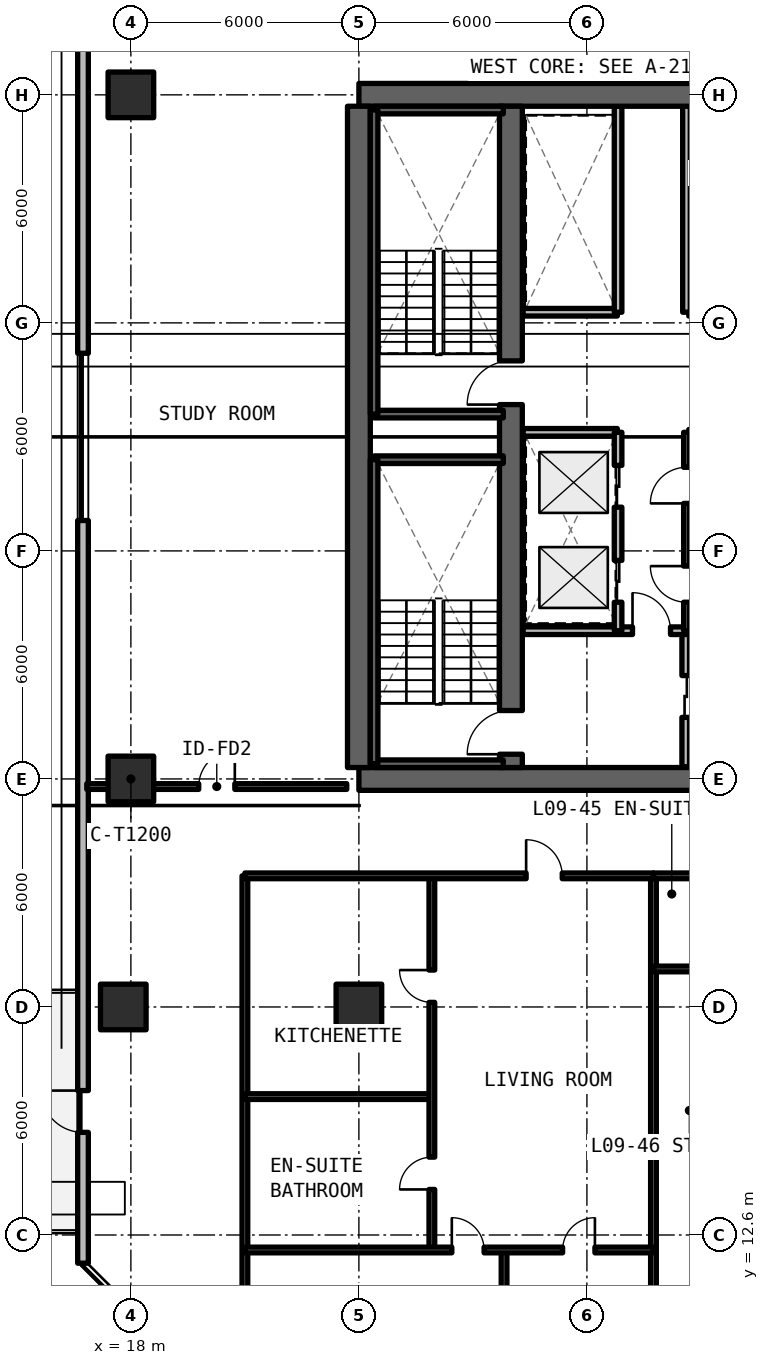
"""IFC4 building model, lengths in metres.
Left out: names, types, materials, properties, quantities, classifications, styles, units other than length and angle.
Written with IfcOpenShell. Run it as: python <this file> out.ifc"""

import sys

from ifc_helpers import new_model, si_unit, direction, frame, frame_2d, origin, origin_2d, place, context, subcontext, project, spatial, rectangle, extrude, element, fill, save


model = new_model("IFC4")
c1 = context("Model", 3, precision=1e-05, world=origin(), true_north=direction((0.0, 1.0)))
c2 = subcontext(c1, "Body", "Model", "MODEL_VIEW")
j1 = project(units=[si_unit("LENGTHUNIT", "METRE"), si_unit("PLANEANGLEUNIT", "RADIAN")], contexts=[c1])
p1 = place(None, origin())
s1 = spatial("IfcSite", under=j1, at=p1, CompositionType="ELEMENT")
p2 = place(p1, origin())
s2 = spatial("IfcBuilding", under=s1, at=p2, CompositionType="ELEMENT")
p3 = place(p2, frame((0.0, 0.0, 35.64)))
s3 = spatial("IfcBuildingStorey", under=s2, at=p3, CompositionType="ELEMENT", Elevation=35.64)
for number, where, z_axis, x_axis in (
    (1, (24.0, 24.6, 0.0), (0.0, 0.0, 1.0), (1.0, 0.0, 0.0)),
    (2, (36.0, 42.6, 0.0), (0.0, 0.0, 1.0), (-1.0, 0.0, 0.0)),
):
    element("IfcWall", number, at=place(p3, frame(where, z_axis=z_axis, x_axis=x_axis)), inside=s3, PredefinedType="SHEAR", context=c2, shape_type="SweptSolid", body=[
        extrude(rectangle(XDim=12.0, YDim=0.6, at=frame_2d((6.0, 0.0))), origin(), (0.0, 0.0, 1.0), 3.3),
    ])
p4 = place(p3, frame((24.0, 24.9, 0.0), z_axis=(0.0, 0.0, 1.0), x_axis=(0.0, 1.0, 0.0)))
e3 = element("IfcWall", 3, at=p4, inside=s3, PredefinedType="SHEAR", context=c2, shape_type="SweptSolid", body=[
    extrude(rectangle(XDim=17.4, YDim=0.6, at=frame_2d((8.7, 0.0))), origin(), (0.0, 0.0, 1.0), 3.3),
])
p5 = place(p3, frame((28.0, 24.9, 0.0), z_axis=(0.0, 0.0, 1.0), x_axis=(0.0, 1.0, 0.0)))
e4 = element("IfcWall", 4, at=p5, inside=s3, PredefinedType="SHEAR", context=c2, shape_type="SweptSolid", body=[
    extrude(rectangle(XDim=17.4, YDim=0.6, at=frame_2d((8.7, 0.0))), origin(), (0.0, 0.0, 1.0), 3.3),
])
p6 = place(p5, frame((0.35, 0.0, 0.0)))
e5 = element("IfcOpeningElement", 5, at=p6, cuts=e4, PredefinedType="OPENING", context=c2, shape_type="SweptSolid", body=[
    extrude(rectangle(XDim=1.15, YDim=2.15, at=frame_2d((0.575, 1.075))), frame((0.0, 0.31, 0.0), z_axis=(0.0, -1.0, 0.0), x_axis=(1.0, 0.0, 0.0)), (0.0, 0.0, 1.0), 0.62),
])
p7 = place(p5, frame((9.55, 0.0, 0.0)))
e6 = element("IfcOpeningElement", 6, at=p7, cuts=e4, PredefinedType="OPENING", context=c2, shape_type="SweptSolid", body=[
    extrude(rectangle(XDim=1.15, YDim=2.15, at=frame_2d((0.575, 1.075))), frame((0.0, 0.31, 0.0), z_axis=(0.0, -1.0, 0.0), x_axis=(1.0, 0.0, 0.0)), (0.0, 0.0, 1.0), 0.62),
])
for number, where, z_axis, x_axis in (
    (7, (18.0, 24.6, 0.0), (0.0, 0.0, 1.0), (1.0, 0.0, 0.0)),
    (8, (18.0, 42.6, 0.0), (0.0, 0.0, 1.0), (1.0, 0.0, 0.0)),
    (9, (17.8, 18.6, 0.0), (0.0, 0.0, 1.0), (1.0, 0.0, 0.0)),
    (10, (24.0, 18.6, 0.0), (0.0, 0.0, 1.0), (1.0, 0.0, 0.0)),
):
    element("IfcColumn", number, at=place(p3, frame(where, z_axis=z_axis, x_axis=x_axis)), inside=s3, PredefinedType="COLUMN", context=c2, shape_type="SweptSolid", body=[
        extrude(rectangle(XDim=1.2, YDim=1.2, at=origin_2d()), origin(), (0.0, 0.0, 1.0), 3.3),
    ])
p8 = place(p3, frame((16.74, 55.342, 0.0), z_axis=(0.0, 0.0, 1.0), x_axis=(0.0, -1.0, 0.0)))
e11 = element("IfcWall", 11, at=p8, inside=s3, PredefinedType="SOLIDWALL", context=c2, shape_type="SweptSolid", body=[
    extrude(rectangle(XDim=43.484, YDim=0.28, at=frame_2d((21.742, 0.0))), origin(), (0.0, 0.0, 1.0), 3.08),
])
p9 = place(p8, frame((38.942, 0.0, 0.0)))
e12 = element("IfcOpeningElement", 12, at=p9, cuts=e11, PredefinedType="OPENING", context=c2, shape_type="SweptSolid", body=[
    extrude(rectangle(XDim=1.1, YDim=2.15, at=frame_2d((0.55, 1.075))), frame((0.0, 0.15, 0.0), z_axis=(0.0, -1.0, 0.0), x_axis=(1.0, 0.0, 0.0)), (0.0, 0.0, 1.0), 0.3),
])
p10 = place(p8, frame((19.542, 0.0, 0.78)))
e13 = element("IfcOpeningElement", 13, at=p10, cuts=e11, PredefinedType="OPENING", context=c2, shape_type="SweptSolid", body=[
    extrude(rectangle(XDim=4.4, YDim=1.66, at=frame_2d((2.2, 0.83))), frame((0.0, 0.15, 0.0), z_axis=(0.0, -1.0, 0.0), x_axis=(1.0, 0.0, 0.0)), (0.0, 0.0, 1.0), 0.3),
])
p11 = place(p3, frame((32.6, 24.92, 0.0), z_axis=(0.0, 0.0, 1.0), x_axis=(0.0, 1.0, 0.0)))
e14 = element("IfcWall", 14, at=p11, inside=s3, PredefinedType="SOLIDWALL", context=c2, shape_type="SweptSolid", body=[
    extrude(rectangle(XDim=3.58, YDim=0.2, at=frame_2d((1.79, 0.0))), origin(), (0.0, 0.0, 1.0), 2.35),
])
p12 = place(p11, frame((1.3, 0.0, 0.0)))
e15 = element("IfcOpeningElement", 15, at=p12, cuts=e14, PredefinedType="OPENING", context=c2, shape_type="SweptSolid", body=[
    extrude(rectangle(XDim=1.1, YDim=2.2, at=frame_2d((0.55, 1.1))), frame((0.0, 0.11, 0.0), z_axis=(0.0, -1.0, 0.0), x_axis=(1.0, 0.0, 0.0)), (0.0, 0.0, 1.0), 0.22),
])
p13 = place(p3, frame((28.32, 28.5, 0.0), z_axis=(0.0, 0.0, 1.0), x_axis=(1.0, 0.0, 0.0)))
e16 = element("IfcWall", 16, at=p13, inside=s3, PredefinedType="SOLIDWALL", context=c2, shape_type="SweptSolid", body=[
    extrude(rectangle(XDim=7.36, YDim=0.2, at=frame_2d((3.68, 0.0))), origin(), (0.0, 0.0, 1.0), 2.35),
])
p14 = place(p13, frame((2.88, 0.0, 0.0)))
e17 = element("IfcOpeningElement", 17, at=p14, cuts=e16, PredefinedType="OPENING", context=c2, shape_type="SweptSolid", body=[
    extrude(rectangle(XDim=1.0, YDim=2.15, at=frame_2d((0.5, 1.075))), frame((0.0, 0.11, 0.0), z_axis=(0.0, -1.0, 0.0), x_axis=(1.0, 0.0, 0.0)), (0.0, 0.0, 1.0), 0.22),
])
p15 = place(p3, frame((28.32, 33.72, 0.0), z_axis=(0.0, 0.0, 1.0), x_axis=(1.0, 0.0, 0.0)))
e18 = element("IfcWall", 18, at=p15, inside=s3, PredefinedType="SOLIDWALL", context=c2, shape_type="SweptSolid", body=[
    extrude(rectangle(XDim=2.48, YDim=0.2, at=frame_2d((1.24, 0.0))), origin(), (0.0, 0.0, 1.0), 2.35),
])
p16 = place(p3, frame((30.82, 28.5, 0.0), z_axis=(0.0, 0.0, 1.0), x_axis=(0.0, 1.0, 0.0)))
e19 = element("IfcWall", 19, at=p16, inside=s3, PredefinedType="SOLIDWALL", context=c2, shape_type="SweptSolid", body=[
    extrude(rectangle(XDim=5.22, YDim=0.2, at=frame_2d((2.61, 0.0))), origin(), (0.0, 0.0, 1.0), 2.35),
])
p17 = place(p16, frame((0.75, 0.0, 0.0)))
e20 = element("IfcOpeningElement", 20, at=p17, cuts=e19, PredefinedType="OPENING", context=c2, shape_type="SweptSolid", body=[
    extrude(rectangle(XDim=1.1, YDim=2.2, at=frame_2d((0.55, 1.1))), frame((0.0, 0.11, 0.0), z_axis=(0.0, -1.0, 0.0), x_axis=(1.0, 0.0, 0.0)), (0.0, 0.0, 1.0), 0.22),
])
p18 = place(p16, frame((3.25, 0.0, 0.0)))
e21 = element("IfcOpeningElement", 21, at=p18, cuts=e19, PredefinedType="OPENING", context=c2, shape_type="SweptSolid", body=[
    extrude(rectangle(XDim=1.1, YDim=2.2, at=frame_2d((0.55, 1.1))), frame((0.0, 0.11, 0.0), z_axis=(0.0, -1.0, 0.0), x_axis=(1.0, 0.0, 0.0)), (0.0, 0.0, 1.0), 0.22),
])
p19 = place(p3, frame((32.62, 28.5, 0.0), z_axis=(0.0, 0.0, 1.0), x_axis=(0.0, 1.0, 0.0)))
e22 = element("IfcWall", 22, at=p19, inside=s3, PredefinedType="SOLIDWALL", context=c2, shape_type="SweptSolid", body=[
    extrude(rectangle(XDim=5.22, YDim=0.15, at=frame_2d((2.61, 0.0))), origin(), (0.0, 0.0, 1.0), 2.35),
])
p20 = place(p19, frame((0.75, 0.0, 0.0)))
e23 = element("IfcOpeningElement", 23, at=p20, cuts=e22, PredefinedType="OPENING", context=c2, shape_type="SweptSolid", body=[
    extrude(rectangle(XDim=0.95, YDim=2.15, at=frame_2d((0.475, 1.075))), frame((0.0, 0.085, 0.0), z_axis=(0.0, -1.0, 0.0), x_axis=(1.0, 0.0, 0.0)), (0.0, 0.0, 1.0), 0.17),
])
p21 = place(p19, frame((3.35, 0.0, 0.0)))
e24 = element("IfcOpeningElement", 24, at=p21, cuts=e22, PredefinedType="OPENING", context=c2, shape_type="SweptSolid", body=[
    extrude(rectangle(XDim=0.95, YDim=2.15, at=frame_2d((0.475, 1.075))), frame((0.0, 0.085, 0.0), z_axis=(0.0, -1.0, 0.0), x_axis=(1.0, 0.0, 0.0)), (0.0, 0.0, 1.0), 0.17),
])
p22 = place(p3, frame((28.32, 36.88, 0.0), z_axis=(0.0, 0.0, 1.0), x_axis=(1.0, 0.0, 0.0)))
e25 = element("IfcWall", 25, at=p22, inside=s3, PredefinedType="SOLIDWALL", context=c2, shape_type="SweptSolid", body=[
    extrude(rectangle(XDim=2.48, YDim=0.2, at=frame_2d((1.24, 0.0))), origin(), (0.0, 0.0, 1.0), 2.35),
])
for number, where, z_axis, x_axis in (
    (26, (30.82, 36.88, 0.0), (0.0, 0.0, 1.0), (0.0, 1.0, 0.0)),
    (27, (32.62, 36.88, 0.0), (0.0, 0.0, 1.0), (0.0, 1.0, 0.0)),
):
    element("IfcWall", number, at=place(p3, frame(where, z_axis=z_axis, x_axis=x_axis)), inside=s3, PredefinedType="SOLIDWALL", context=c2, shape_type="SweptSolid", body=[
        extrude(rectangle(XDim=5.42, YDim=0.2, at=frame_2d((2.71, 0.0))), origin(), (0.0, 0.0, 1.0), 2.35),
    ])
p23 = place(p3, frame((16.84, 24.4, 0.0), z_axis=(0.0, 0.0, 1.0), x_axis=(1.0, 0.0, 0.0)))
e28 = element("IfcWall", 28, at=p23, inside=s3, PredefinedType="SOLIDWALL", context=c2, shape_type="SweptSolid", body=[
    extrude(rectangle(XDim=6.84, YDim=0.15, at=frame_2d((3.42, 0.0))), origin(), (0.0, 0.0, 1.0), 2.295),
])
p24 = place(p23, frame((2.945, 0.0, 0.0)))
e29 = element("IfcOpeningElement", 29, at=p24, cuts=e28, PredefinedType="OPENING", context=c2, shape_type="SweptSolid", body=[
    extrude(rectangle(XDim=0.95, YDim=2.15, at=frame_2d((0.475, 1.075))), frame((0.0, 0.085, 0.0), z_axis=(0.0, -1.0, 0.0), x_axis=(1.0, 0.0, 0.0)), (0.0, 0.0, 1.0), 0.17),
])
for number, where, z_axis, x_axis in (
    (30, (21.0, 7.88, 0.0), (0.0, 0.0, 1.0), (0.0, 1.0, 0.0)),
    (31, (31.751, 7.88, 0.0), (0.0, 0.0, 1.0), (0.0, 1.0, 0.0)),
):
    element("IfcWall", number, at=place(p3, frame(where, z_axis=z_axis, x_axis=x_axis)), inside=s3, PredefinedType="SOLIDWALL", context=c2, shape_type="SweptSolid", body=[
        extrude(rectangle(XDim=14.17, YDim=0.15, at=frame_2d((7.085, 0.0))), origin(), (0.0, 0.0, 1.0), 2.35),
    ])
p25 = place(p3, frame((21.0, 16.242, 0.0), z_axis=(0.0, 0.0, 1.0), x_axis=(1.0, 0.0, 0.0)))
e32 = element("IfcWall", 32, at=p25, inside=s3, PredefinedType="PARTITIONING", context=c2, shape_type="SweptSolid", body=[
    extrude(rectangle(XDim=4.92, YDim=0.15, at=frame_2d((2.46, 0.0))), origin(), (0.0, 0.0, 1.0), 2.35),
])
p26 = place(p3, frame((25.92, 12.206, 0.0), z_axis=(0.0, 0.0, 1.0), x_axis=(0.0, 1.0, 0.0)))
e33 = element("IfcWall", 33, at=p26, inside=s3, PredefinedType="PARTITIONING", context=c2, shape_type="SweptSolid", body=[
    extrude(rectangle(XDim=9.844, YDim=0.15, at=frame_2d((4.922, 0.0))), origin(), (0.0, 0.0, 1.0), 2.35),
])
p27 = place(p26, frame((1.593, 0.0, 0.0)))
e34 = element("IfcOpeningElement", 34, at=p27, cuts=e33, PredefinedType="OPENING", context=c2, shape_type="SweptSolid", body=[
    extrude(rectangle(XDim=0.85, YDim=2.1, at=frame_2d((0.425, 1.05))), frame((0.0, 0.085, 0.0), z_axis=(0.0, -1.0, 0.0), x_axis=(1.0, 0.0, 0.0)), (0.0, 0.0, 1.0), 0.17),
])
p28 = place(p26, frame((6.515, 0.0, 0.0)))
e35 = element("IfcOpeningElement", 35, at=p28, cuts=e33, PredefinedType="OPENING", context=c2, shape_type="SweptSolid", body=[
    extrude(rectangle(XDim=0.85, YDim=2.1, at=frame_2d((0.425, 1.05))), frame((0.0, 0.085, 0.0), z_axis=(0.0, -1.0, 0.0), x_axis=(1.0, 0.0, 0.0)), (0.0, 0.0, 1.0), 0.17),
])
p29 = place(p3, frame((27.82, 7.88, 0.0), z_axis=(0.0, 0.0, 1.0), x_axis=(0.0, 1.0, 0.0)))
e36 = element("IfcWall", 36, at=p29, inside=s3, PredefinedType="PARTITIONING", context=c2, shape_type="SweptSolid", body=[
    extrude(rectangle(XDim=4.326, YDim=0.15, at=frame_2d((2.163, 0.0))), origin(), (0.0, 0.0, 1.0), 2.35),
])
p30 = place(p3, frame((21.0, 12.206, 0.0), z_axis=(0.0, 0.0, 1.0), x_axis=(1.0, 0.0, 0.0)))
e37 = element("IfcWall", 37, at=p30, inside=s3, PredefinedType="PARTITIONING", context=c2, shape_type="SweptSolid", body=[
    extrude(rectangle(XDim=10.751, YDim=0.15, at=frame_2d((5.375, 0.0))), origin(), (0.0, 0.0, 1.0), 2.35),
])
p31 = place(p30, frame((5.445, 0.0, 0.0)))
e38 = element("IfcOpeningElement", 38, at=p31, cuts=e37, PredefinedType="OPENING", context=c2, shape_type="SweptSolid", body=[
    extrude(rectangle(XDim=0.85, YDim=2.1, at=frame_2d((0.425, 1.05))), frame((0.0, 0.085, 0.0), z_axis=(0.0, -1.0, 0.0), x_axis=(1.0, 0.0, 0.0)), (0.0, 0.0, 1.0), 0.17),
])
p32 = place(p30, frame((8.361, 0.0, 0.0)))
e39 = element("IfcOpeningElement", 39, at=p32, cuts=e37, PredefinedType="OPENING", context=c2, shape_type="SweptSolid", body=[
    extrude(rectangle(XDim=0.85, YDim=2.1, at=frame_2d((0.425, 1.05))), frame((0.0, 0.085, 0.0), z_axis=(0.0, -1.0, 0.0), x_axis=(1.0, 0.0, 0.0)), (0.0, 0.0, 1.0), 0.17),
])
p33 = place(p3, frame((21.0, 22.05, 0.0), z_axis=(0.0, 0.0, 1.0), x_axis=(1.0, 0.0, 0.0)))
e40 = element("IfcWall", 40, at=p33, inside=s3, PredefinedType="SOLIDWALL", context=c2, shape_type="SweptSolid", body=[
    extrude(rectangle(XDim=10.751, YDim=0.15, at=frame_2d((5.375, 0.0))), origin(), (0.0, 0.0, 1.0), 2.35),
])
p34 = place(p33, frame((7.401, 0.0, 0.0)))
e41 = element("IfcOpeningElement", 41, at=p34, cuts=e40, PredefinedType="OPENING", context=c2, shape_type="SweptSolid", body=[
    extrude(rectangle(XDim=0.95, YDim=2.15, at=frame_2d((0.475, 1.075))), frame((0.0, 0.085, 0.0), z_axis=(0.0, -1.0, 0.0), x_axis=(1.0, 0.0, 0.0)), (0.0, 0.0, 1.0), 0.17),
])
p35 = place(p3, frame((31.751, 19.6, 0.0), z_axis=(0.0, 0.0, 1.0), x_axis=(1.0, 0.0, 0.0)))
e42 = element("IfcWall", 42, at=p35, inside=s3, PredefinedType="PARTITIONING", context=c2, shape_type="SweptSolid", body=[
    extrude(rectangle(XDim=1.959, YDim=0.15, at=frame_2d((0.979, 0.0))), origin(), (0.0, 0.0, 1.0), 2.35),
])
p36 = place(p3, frame((31.751, 22.05, 0.0), z_axis=(0.0, 0.0, 1.0), x_axis=(1.0, 0.0, 0.0)))
e43 = element("IfcWall", 43, at=p36, inside=s3, PredefinedType="SOLIDWALL", context=c2, shape_type="SweptSolid", body=[
    extrude(rectangle(XDim=5.761, YDim=0.15, at=frame_2d((2.881, 0.0))), origin(), (0.0, 0.0, 1.0), 2.35),
])
p37 = place(p36, frame((3.425, 0.0, 0.0)))
e44 = element("IfcOpeningElement", 44, at=p37, cuts=e43, PredefinedType="OPENING", context=c2, shape_type="SweptSolid", body=[
    extrude(rectangle(XDim=0.95, YDim=2.15, at=frame_2d((0.475, 1.075))), frame((0.0, 0.085, 0.0), z_axis=(0.0, -1.0, 0.0), x_axis=(1.0, 0.0, 0.0)), (0.0, 0.0, 1.0), 0.17),
])
for number, where, z_axis, x_axis in (
    (45, (24.4, 25.0, 0.0), (0.0, 0.0, 1.0), (1.0, 0.0, 0.0)),
    (46, (27.8, 33.0, 0.0), (0.0, 0.0, 1.0), (-1.0, 0.0, 0.0)),
):
    element("IfcWall", number, at=place(p3, frame(where, z_axis=z_axis, x_axis=x_axis)), inside=s3, PredefinedType="SOLIDWALL", context=c2, shape_type="SweptSolid", body=[
        extrude(rectangle(XDim=3.4, YDim=0.2, at=frame_2d((1.7, 0.0))), origin(), (0.0, 0.0, 1.0), 3.3),
    ])
p38 = place(p3, frame((24.4, 33.0, 0.0), z_axis=(0.0, 0.0, 1.0), x_axis=(0.0, -1.0, 0.0)))
e47 = element("IfcWall", 47, at=p38, inside=s3, PredefinedType="SOLIDWALL", context=c2, shape_type="SweptSolid", body=[
    extrude(rectangle(XDim=8.0, YDim=0.2, at=frame_2d((4.0, 0.0))), origin(), (0.0, 0.0, 1.0), 3.3),
])
for number, where, z_axis, x_axis in (
    (48, (24.4, 34.2, 0.0), (0.0, 0.0, 1.0), (1.0, 0.0, 0.0)),
    (49, (27.8, 42.2, 0.0), (0.0, 0.0, 1.0), (-1.0, 0.0, 0.0)),
):
    element("IfcWall", number, at=place(p3, frame(where, z_axis=z_axis, x_axis=x_axis)), inside=s3, PredefinedType="SOLIDWALL", context=c2, shape_type="SweptSolid", body=[
        extrude(rectangle(XDim=3.4, YDim=0.2, at=frame_2d((1.7, 0.0))), origin(), (0.0, 0.0, 1.0), 3.3),
    ])
p39 = place(p3, frame((24.4, 42.2, 0.0), z_axis=(0.0, 0.0, 1.0), x_axis=(0.0, -1.0, 0.0)))
e50 = element("IfcWall", 50, at=p39, inside=s3, PredefinedType="SOLIDWALL", context=c2, shape_type="SweptSolid", body=[
    extrude(rectangle(XDim=8.0, YDim=0.2, at=frame_2d((4.0, 0.0))), origin(), (0.0, 0.0, 1.0), 3.3),
])
p40 = place(p9, frame((1.1, 0.0, 0.0), z_axis=(0.0, 0.0, 1.0), x_axis=(-1.0, 0.0, 0.0)))
e51 = element("IfcDoor", 51, at=p40, inside=s3, OperationType="SINGLE_SWING_LEFT", PredefinedType="DOOR", context=c2, shape_type="SweptSolid", body=[
    extrude(rectangle(XDim=1.1, YDim=2.15, at=frame_2d((0.55, 1.075))), frame((0.0, 0.025, 0.0), z_axis=(0.0, -1.0, 0.0), x_axis=(1.0, 0.0, 0.0)), (0.0, 0.0, 1.0), 0.05),
])
fill(e12, e51)
p41 = place(p10, origin())
e52 = element("IfcWindow", 52, at=p41, inside=s3, PartitioningType="SINGLE_PANEL", PredefinedType="WINDOW", context=c2, shape_type="SweptSolid", body=[
    extrude(rectangle(XDim=4.4, YDim=1.66, at=frame_2d((2.2, 0.83))), frame((0.0, 0.03, 0.0), z_axis=(0.0, -1.0, 0.0), x_axis=(1.0, 0.0, 0.0)), (0.0, 0.0, 1.0), 0.06),
])
fill(e13, e52)
p42 = place(p12, origin())
e53 = element("IfcDoor", 53, at=p42, inside=s3, OperationType="SLIDING_TO_LEFT", PredefinedType="DOOR", context=c2, shape_type="SweptSolid", body=[
    extrude(rectangle(XDim=1.1, YDim=2.2, at=frame_2d((0.55, 1.1))), frame((0.0, 0.025, 0.0), z_axis=(0.0, -1.0, 0.0), x_axis=(1.0, 0.0, 0.0)), (0.0, 0.0, 1.0), 0.05),
])
fill(e15, e53)
p43 = place(p14, origin())
e54 = element("IfcDoor", 54, at=p43, inside=s3, OperationType="SINGLE_SWING_LEFT", PredefinedType="DOOR", context=c2, shape_type="SweptSolid", body=[
    extrude(rectangle(XDim=1.0, YDim=2.15, at=frame_2d((0.5, 1.075))), frame((0.0, 0.025, 0.0), z_axis=(0.0, -1.0, 0.0), x_axis=(1.0, 0.0, 0.0)), (0.0, 0.0, 1.0), 0.05),
])
fill(e17, e54)
p44 = place(p17, origin())
e55 = element("IfcDoor", 55, at=p44, inside=s3, OperationType="SLIDING_TO_LEFT", PredefinedType="DOOR", context=c2, shape_type="SweptSolid", body=[
    extrude(rectangle(XDim=1.1, YDim=2.2, at=frame_2d((0.55, 1.1))), frame((0.0, 0.025, 0.0), z_axis=(0.0, -1.0, 0.0), x_axis=(1.0, 0.0, 0.0)), (0.0, 0.0, 1.0), 0.05),
])
fill(e20, e55)
p45 = place(p18, origin())
e56 = element("IfcDoor", 56, at=p45, inside=s3, OperationType="SLIDING_TO_RIGHT", PredefinedType="DOOR", context=c2, shape_type="SweptSolid", body=[
    extrude(rectangle(XDim=1.1, YDim=2.2, at=frame_2d((0.55, 1.1))), frame((0.0, 0.025, 0.0), z_axis=(0.0, -1.0, 0.0), x_axis=(1.0, 0.0, 0.0)), (0.0, 0.0, 1.0), 0.05),
])
fill(e21, e56)
p46 = place(p20, origin())
e57 = element("IfcDoor", 57, at=p46, inside=s3, OperationType="SINGLE_SWING_RIGHT", PredefinedType="DOOR", context=c2, shape_type="SweptSolid", body=[
    extrude(rectangle(XDim=0.95, YDim=2.15, at=frame_2d((0.475, 1.075))), frame((0.0, 0.025, 0.0), z_axis=(0.0, -1.0, 0.0), x_axis=(1.0, 0.0, 0.0)), (0.0, 0.0, 1.0), 0.05),
])
fill(e23, e57)
p47 = place(p21, origin())
e58 = element("IfcDoor", 58, at=p47, inside=s3, OperationType="SINGLE_SWING_LEFT", PredefinedType="DOOR", context=c2, shape_type="SweptSolid", body=[
    extrude(rectangle(XDim=0.95, YDim=2.15, at=frame_2d((0.475, 1.075))), frame((0.0, 0.025, 0.0), z_axis=(0.0, -1.0, 0.0), x_axis=(1.0, 0.0, 0.0)), (0.0, 0.0, 1.0), 0.05),
])
fill(e24, e58)
p48 = place(p24, origin())
e59 = element("IfcDoor", 59, at=p48, inside=s3, OperationType="SINGLE_SWING_RIGHT", PredefinedType="DOOR", context=c2, shape_type="SweptSolid", body=[
    extrude(rectangle(XDim=0.95, YDim=2.15, at=frame_2d((0.475, 1.075))), frame((0.0, 0.025, 0.0), z_axis=(0.0, -1.0, 0.0), x_axis=(1.0, 0.0, 0.0)), (0.0, 0.0, 1.0), 0.05),
])
fill(e29, e59)
p49 = place(p27, origin())
e60 = element("IfcDoor", 60, at=p49, inside=s3, OperationType="SINGLE_SWING_LEFT", PredefinedType="DOOR", context=c2, shape_type="SweptSolid", body=[
    extrude(rectangle(XDim=0.85, YDim=2.1, at=frame_2d((0.425, 1.05))), frame((0.0, 0.025, 0.0), z_axis=(0.0, -1.0, 0.0), x_axis=(1.0, 0.0, 0.0)), (0.0, 0.0, 1.0), 0.05),
])
fill(e34, e60)
p50 = place(p28, origin())
e61 = element("IfcDoor", 61, at=p50, inside=s3, OperationType="SINGLE_SWING_RIGHT", PredefinedType="DOOR", context=c2, shape_type="SweptSolid", body=[
    extrude(rectangle(XDim=0.85, YDim=2.1, at=frame_2d((0.425, 1.05))), frame((0.0, 0.025, 0.0), z_axis=(0.0, -1.0, 0.0), x_axis=(1.0, 0.0, 0.0)), (0.0, 0.0, 1.0), 0.05),
])
fill(e35, e61)
p51 = place(p31, origin())
e62 = element("IfcDoor", 62, at=p51, inside=s3, OperationType="SINGLE_SWING_LEFT", PredefinedType="DOOR", context=c2, shape_type="SweptSolid", body=[
    extrude(rectangle(XDim=0.85, YDim=2.1, at=frame_2d((0.425, 1.05))), frame((0.0, 0.025, 0.0), z_axis=(0.0, -1.0, 0.0), x_axis=(1.0, 0.0, 0.0)), (0.0, 0.0, 1.0), 0.05),
])
fill(e38, e62)
p52 = place(p32, origin())
e63 = element("IfcDoor", 63, at=p52, inside=s3, OperationType="SINGLE_SWING_RIGHT", PredefinedType="DOOR", context=c2, shape_type="SweptSolid", body=[
    extrude(rectangle(XDim=0.85, YDim=2.1, at=frame_2d((0.425, 1.05))), frame((0.0, 0.025, 0.0), z_axis=(0.0, -1.0, 0.0), x_axis=(1.0, 0.0, 0.0)), (0.0, 0.0, 1.0), 0.05),
])
fill(e39, e63)
p53 = place(p34, origin())
e64 = element("IfcDoor", 64, at=p53, inside=s3, OperationType="SINGLE_SWING_LEFT", PredefinedType="DOOR", context=c2, shape_type="SweptSolid", body=[
    extrude(rectangle(XDim=0.95, YDim=2.15, at=frame_2d((0.475, 1.075))), frame((0.0, 0.025, 0.0), z_axis=(0.0, -1.0, 0.0), x_axis=(1.0, 0.0, 0.0)), (0.0, 0.0, 1.0), 0.05),
])
fill(e41, e64)
p54 = place(p6, origin())
e65 = element("IfcDoor", 65, at=p54, inside=s3, OperationType="SINGLE_SWING_LEFT", PredefinedType="DOOR", context=c2, shape_type="SweptSolid", body=[
    extrude(rectangle(XDim=1.15, YDim=2.15, at=frame_2d((0.575, 1.075))), frame((0.0, 0.025, 0.0), z_axis=(0.0, -1.0, 0.0), x_axis=(1.0, 0.0, 0.0)), (0.0, 0.0, 1.0), 0.05),
])
fill(e5, e65)
p55 = place(p7, origin())
e66 = element("IfcDoor", 66, at=p55, inside=s3, OperationType="SINGLE_SWING_RIGHT", PredefinedType="DOOR", context=c2, shape_type="SweptSolid", body=[
    extrude(rectangle(XDim=1.15, YDim=2.15, at=frame_2d((0.575, 1.075))), frame((0.0, 0.025, 0.0), z_axis=(0.0, -1.0, 0.0), x_axis=(1.0, 0.0, 0.0)), (0.0, 0.0, 1.0), 0.05),
])
fill(e6, e66)
save(model, sys.argv[1])
